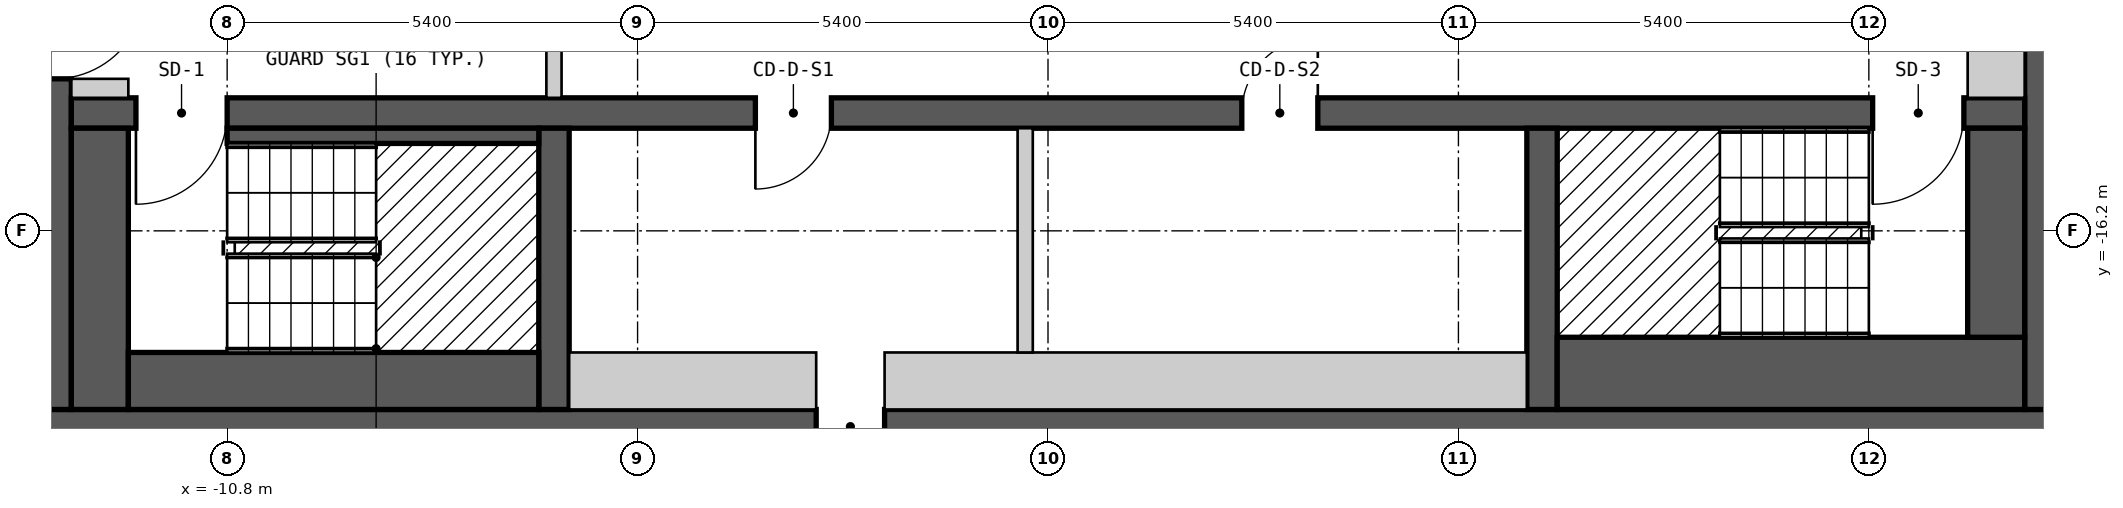
"""IFC4 building model, lengths in metres.
Left out: names, types, materials, properties, quantities, classifications, styles, units other than length and angle.
Written with IfcOpenShell. Run it as: python <this file> out.ifc"""

import sys

from ifc_helpers import new_model, si_unit, direction, frame, frame_2d, origin, place, context, subcontext, project, spatial, polyline, rectangle, outline, extrude, element, fill, save


model = new_model("IFC4")
c1 = context("Model", 3, precision=1e-05, world=origin(), true_north=direction((0.0, 1.0)))
c2 = subcontext(c1, "Body", "Model", "MODEL_VIEW")
j1 = project(units=[si_unit("LENGTHUNIT", "METRE"), si_unit("PLANEANGLEUNIT", "RADIAN")], contexts=[c1])
p1 = place(None, origin())
s1 = spatial("IfcSite", under=j1, at=p1, CompositionType="ELEMENT")
p2 = place(p1, origin())
s2 = spatial("IfcBuilding", under=s1, at=p2, CompositionType="ELEMENT")
p3 = place(p2, frame((0.0, 0.0, 238.8)))
s3 = spatial("IfcBuildingStorey", under=s2, at=p3, CompositionType="ELEMENT", Elevation=238.8)
p4 = place(p3, frame((-13.3, -18.775, 0.0), z_axis=(0.0, 0.0, 1.0), x_axis=(1.0, 0.0, 0.0)))
e1 = element("IfcWall", 1, at=p4, inside=s3, PredefinedType="SHEAR", context=c2, shape_type="SweptSolid", body=[
    extrude(rectangle(XDim=26.6, YDim=0.45, at=frame_2d((13.3, 0.0))), origin(), (0.0, 0.0, 1.0), 2.7),
])
p5 = place(p4, frame((10.25, 0.0, 0.0)))
e2 = element("IfcOpeningElement", 2, at=p5, cuts=e1, PredefinedType="OPENING", context=c2, shape_type="SweptSolid", body=[
    extrude(rectangle(XDim=0.9, YDim=2.1, at=frame_2d((0.45, 1.05))), frame((0.0, 0.235, 0.0), z_axis=(0.0, -1.0, 0.0), x_axis=(1.0, 0.0, 0.0)), (0.0, 0.0, 1.0), 0.47),
])
p6 = place(p3, frame((-13.075, -18.55, 0.0), z_axis=(0.0, 0.0, 1.0), x_axis=(0.0, 1.0, 0.0)))
e3 = element("IfcWall", 3, at=p6, inside=s3, PredefinedType="SHEAR", context=c2, shape_type="SweptSolid", body=[
    extrude(rectangle(XDim=13.1, YDim=0.45, at=frame_2d((6.55, 0.0))), origin(), (0.0, 0.0, 1.0), 2.7),
])
p7 = place(p6, frame((4.35, 0.0, 0.0)))
e4 = element("IfcOpeningElement", 4, at=p7, cuts=e3, PredefinedType="OPENING", context=c2, shape_type="SweptSolid", body=[
    extrude(rectangle(XDim=1.2, YDim=2.1, at=frame_2d((0.6, 1.05))), frame((0.0, 0.235, 0.0), z_axis=(0.0, -1.0, 0.0), x_axis=(1.0, 0.0, 0.0)), (0.0, 0.0, 1.0), 0.47),
])
p8 = place(p3, frame((13.075, -18.55, 0.0), z_axis=(0.0, 0.0, 1.0), x_axis=(0.0, 1.0, 0.0)))
e5 = element("IfcWall", 5, at=p8, inside=s3, PredefinedType="SHEAR", context=c2, shape_type="SweptSolid", body=[
    extrude(rectangle(XDim=13.1, YDim=0.45, at=frame_2d((6.55, 0.0))), origin(), (0.0, 0.0, 1.0), 2.7),
])
p9 = place(p3, frame((-12.85, -14.65, 0.0), z_axis=(0.0, 0.0, 1.0), x_axis=(1.0, 0.0, 0.0)))
e6 = element("IfcWall", 6, at=p9, inside=s3, PredefinedType="SHEAR", context=c2, shape_type="SweptSolid", body=[
    extrude(rectangle(XDim=25.7, YDim=0.4, at=frame_2d((12.85, 0.0))), origin(), (0.0, 0.0, 1.0), 2.7),
])
p10 = place(p9, frame((2.05, 0.0, 0.0), z_axis=(0.0, 0.0, 1.0), x_axis=(-1.0, 0.0, 0.0)))
e7 = element("IfcOpeningElement", 7, at=p10, cuts=e6, PredefinedType="OPENING", context=c2, shape_type="SweptSolid", body=[
    extrude(rectangle(XDim=1.2, YDim=2.1, at=frame_2d((0.6, 1.05))), frame((0.0, 0.21, 0.0), z_axis=(0.0, -1.0, 0.0), x_axis=(1.0, 0.0, 0.0)), (0.0, 0.0, 1.0), 0.42),
])
p11 = place(p9, frame((24.9, 0.0, 0.0), z_axis=(0.0, 0.0, 1.0), x_axis=(-1.0, 0.0, 0.0)))
e8 = element("IfcOpeningElement", 8, at=p11, cuts=e6, PredefinedType="OPENING", context=c2, shape_type="SweptSolid", body=[
    extrude(rectangle(XDim=1.2, YDim=2.1, at=frame_2d((0.6, 1.05))), frame((0.0, 0.21, 0.0), z_axis=(0.0, -1.0, 0.0), x_axis=(1.0, 0.0, 0.0)), (0.0, 0.0, 1.0), 0.42),
])
p12 = place(p9, frame((10.0, 0.0, 0.0), z_axis=(0.0, 0.0, 1.0), x_axis=(-1.0, 0.0, 0.0)))
e9 = element("IfcOpeningElement", 9, at=p12, cuts=e6, PredefinedType="OPENING", context=c2, shape_type="SweptSolid", body=[
    extrude(rectangle(XDim=1.0, YDim=2.1, at=frame_2d((0.5, 1.05))), frame((0.0, 0.21, 0.0), z_axis=(0.0, -1.0, 0.0), x_axis=(1.0, 0.0, 0.0)), (0.0, 0.0, 1.0), 0.42),
])
p13 = place(p9, frame((16.4, 0.0, 0.0), z_axis=(0.0, 0.0, 1.0), x_axis=(-1.0, 0.0, 0.0)))
e10 = element("IfcOpeningElement", 10, at=p13, cuts=e6, PredefinedType="OPENING", context=c2, shape_type="SweptSolid", body=[
    extrude(rectangle(XDim=1.0, YDim=2.1, at=frame_2d((0.5, 1.05))), frame((0.0, 0.21, 0.0), z_axis=(0.0, -1.0, 0.0), x_axis=(1.0, 0.0, 0.0)), (0.0, 0.0, 1.0), 0.42),
])
for number, where, z_axis, x_axis in (
    (11, (-6.5, -18.55, 0.0), (0.0, 0.0, 1.0), (0.0, 1.0, 0.0)),
    (12, (6.5, -18.55, 0.0), (0.0, 0.0, 1.0), (0.0, 1.0, 0.0)),
):
    element("IfcWall", number, at=place(p3, frame(where, z_axis=z_axis, x_axis=x_axis)), inside=s3, PredefinedType="SHEAR", context=c2, shape_type="SweptSolid", body=[
        extrude(rectangle(XDim=3.7, YDim=0.4, at=frame_2d((1.85, 0.0))), origin(), (0.0, 0.0, 1.0), 2.7),
    ])
p14 = place(p3, frame((-15.34, -18.37, 0.0), z_axis=(0.0, 0.0, 1.0), x_axis=(0.866022959057, -0.500004234368, 0.0)))
e13 = element("IfcWall", 13, at=p14, inside=s3, PredefinedType="SOLIDWALL", context=c2, shape_type="SweptSolid", body=[
    extrude(outline(polyline([(0.0, -0.15), (5.0, -0.15), (4.92, 0.15), (0.08, 0.15), (0.0, -0.15)])), origin(), (0.0, 0.0, 1.0), 2.7),
])
p15 = place(p14, frame((0.65, 0.0, 0.15)))
e14 = element("IfcOpeningElement", 14, at=p15, cuts=e13, PredefinedType="OPENING", context=c2, shape_type="SweptSolid", body=[
    extrude(rectangle(XDim=1.2, YDim=2.1, at=frame_2d((0.6, 1.05))), frame((0.0, 0.16, 0.0), z_axis=(0.0, -1.0, 0.0), x_axis=(1.0, 0.0, 0.0)), (0.0, 0.0, 1.0), 0.32),
])
p16 = place(p14, frame((3.15, 0.0, 0.15)))
e15 = element("IfcOpeningElement", 15, at=p16, cuts=e13, PredefinedType="OPENING", context=c2, shape_type="SweptSolid", body=[
    extrude(rectangle(XDim=1.2, YDim=2.1, at=frame_2d((0.6, 1.05))), frame((0.0, 0.16, 0.0), z_axis=(0.0, -1.0, 0.0), x_axis=(1.0, 0.0, 0.0)), (0.0, 0.0, 1.0), 0.32),
])
p17 = place(p3, frame((11.01, -20.87, 0.0), z_axis=(0.0, 0.0, 1.0), x_axis=(0.866022959057, 0.500004234368, 0.0)))
e16 = element("IfcWall", 16, at=p17, inside=s3, PredefinedType="SOLIDWALL", context=c2, shape_type="SweptSolid", body=[
    extrude(outline(polyline([(0.0, -0.15), (5.0, -0.15), (4.92, 0.15), (0.08, 0.15), (0.0, -0.15)])), origin(), (0.0, 0.0, 1.0), 2.7),
])
p18 = place(p17, frame((0.65, 0.0, 0.15)))
e17 = element("IfcOpeningElement", 17, at=p18, cuts=e16, PredefinedType="OPENING", context=c2, shape_type="SweptSolid", body=[
    extrude(rectangle(XDim=1.2, YDim=2.1, at=frame_2d((0.6, 1.05))), frame((0.0, 0.16, 0.0), z_axis=(0.0, -1.0, 0.0), x_axis=(1.0, 0.0, 0.0)), (0.0, 0.0, 1.0), 0.32),
])
p19 = place(p17, frame((3.149, 0.0, 0.15)))
e18 = element("IfcOpeningElement", 18, at=p19, cuts=e16, PredefinedType="OPENING", context=c2, shape_type="SweptSolid", body=[
    extrude(rectangle(XDim=1.2, YDim=2.1, at=frame_2d((0.6, 1.05))), frame((0.0, 0.16, 0.0), z_axis=(0.0, -1.0, 0.0), x_axis=(1.0, 0.0, 0.0)), (0.0, 0.0, 1.0), 0.32),
])
p20 = place(p3, frame((-12.475, -18.55, 0.0), z_axis=(0.0, 0.0, 1.0), x_axis=(0.0, 1.0, 0.0)))
e19 = element("IfcWall", 19, at=p20, inside=s3, PredefinedType="SOLIDWALL", context=c2, shape_type="SweptSolid", body=[
    extrude(rectangle(XDim=3.7, YDim=0.75, at=frame_2d((1.85, 0.0))), origin(), (0.0, 0.0, 1.0), 2.7),
])
p21 = place(p3, frame((-12.85, -14.325, 0.0), z_axis=(0.0, 0.0, 1.0), x_axis=(1.0, 0.0, 0.0)))
e20 = element("IfcWall", 20, at=p21, inside=s3, PredefinedType="PARTITIONING", context=c2, shape_type="SweptSolid", body=[
    extrude(rectangle(XDim=0.75, YDim=0.25, at=frame_2d((0.375, 0.0))), origin(), (0.0, 0.0, 1.0), 2.7),
])
p22 = place(p3, frame((-12.1, -18.175, 0.0), z_axis=(0.0, 0.0, 1.0), x_axis=(1.0, 0.0, 0.0)))
e21 = element("IfcWall", 21, at=p22, inside=s3, PredefinedType="SOLIDWALL", context=c2, shape_type="SweptSolid", body=[
    extrude(rectangle(XDim=5.4, YDim=0.75, at=frame_2d((2.7, 0.0))), origin(), (0.0, 0.0, 1.0), 2.7),
])
p23 = place(p3, frame((-10.8, -14.95, 0.0), z_axis=(0.0, 0.0, 1.0), x_axis=(1.0, 0.0, 0.0)))
e22 = element("IfcWall", 22, at=p23, inside=s3, PredefinedType="SOLIDWALL", context=c2, shape_type="SweptSolid", body=[
    extrude(rectangle(XDim=4.1, YDim=0.2, at=frame_2d((2.05, 0.0))), origin(), (0.0, 0.0, 1.0), 2.7),
])
p24 = place(p3, frame((-6.5, -14.45, 0.0), z_axis=(0.0, 0.0, 1.0), x_axis=(0.0, 1.0, 0.0)))
e23 = element("IfcWall", 23, at=p24, inside=s3, PredefinedType="PARTITIONING", context=c2, shape_type="SweptSolid", body=[
    extrude(rectangle(XDim=4.9, YDim=0.2, at=frame_2d((2.45, 0.0))), origin(), (0.0, 0.0, 1.0), 2.7),
])
p25 = place(p24, frame((3.15, 0.0, 0.0), z_axis=(0.0, 0.0, 1.0), x_axis=(-1.0, 0.0, 0.0)))
e24 = element("IfcOpeningElement", 24, at=p25, cuts=e23, PredefinedType="OPENING", context=c2, shape_type="SweptSolid", body=[
    extrude(rectangle(XDim=1.4, YDim=2.1, at=frame_2d((0.7, 1.05))), frame((0.0, 0.11, 0.0), z_axis=(0.0, -1.0, 0.0), x_axis=(1.0, 0.0, 0.0)), (0.0, 0.0, 1.0), 0.22),
])
p26 = place(p3, frame((-6.3, -18.175, 0.0), z_axis=(0.0, 0.0, 1.0), x_axis=(1.0, 0.0, 0.0)))
e25 = element("IfcWall", 25, at=p26, inside=s3, PredefinedType="PARTITIONING", context=c2, shape_type="SweptSolid", body=[
    extrude(rectangle(XDim=3.25, YDim=0.75, at=frame_2d((1.625, 0.0))), origin(), (0.0, 0.0, 1.0), 2.7),
])
p27 = place(p3, frame((-2.15, -18.175, 0.0), z_axis=(0.0, 0.0, 1.0), x_axis=(1.0, 0.0, 0.0)))
e26 = element("IfcWall", 26, at=p27, inside=s3, PredefinedType="PARTITIONING", context=c2, shape_type="SweptSolid", body=[
    extrude(rectangle(XDim=8.45, YDim=0.75, at=frame_2d((4.225, 0.0))), origin(), (0.0, 0.0, 1.0), 2.7),
])
p28 = place(p3, frame((-0.3, -17.8, 0.0), z_axis=(0.0, 0.0, 1.0), x_axis=(0.0, 1.0, 0.0)))
e27 = element("IfcWall", 27, at=p28, inside=s3, PredefinedType="PARTITIONING", context=c2, shape_type="SweptSolid", body=[
    extrude(rectangle(XDim=2.95, YDim=0.2, at=frame_2d((1.475, 0.0))), origin(), (0.0, 0.0, 1.0), 2.7),
])
p29 = place(p3, frame((6.7, -18.075, 0.0), z_axis=(0.0, 0.0, 1.0), x_axis=(1.0, 0.0, 0.0)))
e28 = element("IfcWall", 28, at=p29, inside=s3, PredefinedType="SOLIDWALL", context=c2, shape_type="SweptSolid", body=[
    extrude(rectangle(XDim=6.15, YDim=0.95, at=frame_2d((3.075, 0.0))), origin(), (0.0, 0.0, 1.0), 2.7),
])
p30 = place(p3, frame((12.475, -17.6, 0.0), z_axis=(0.0, 0.0, 1.0), x_axis=(0.0, 1.0, 0.0)))
e29 = element("IfcWall", 29, at=p30, inside=s3, PredefinedType="SOLIDWALL", context=c2, shape_type="SweptSolid", body=[
    extrude(rectangle(XDim=2.75, YDim=0.75, at=frame_2d((1.375, 0.0))), origin(), (0.0, 0.0, 1.0), 2.7),
])
p31 = place(p3, frame((12.475, -14.45, 0.0), z_axis=(0.0, 0.0, 1.0), x_axis=(0.0, 1.0, 0.0)))
e30 = element("IfcWall", 30, at=p31, inside=s3, PredefinedType="PARTITIONING", context=c2, shape_type="SweptSolid", body=[
    extrude(rectangle(XDim=8.25, YDim=0.75, at=frame_2d((4.125, 0.0))), origin(), (0.0, 0.0, 1.0), 2.7),
])
p32 = place(p10, origin())
e31 = element("IfcDoor", 31, at=p32, inside=s3, OperationType="SINGLE_SWING_RIGHT", PredefinedType="DOOR", context=c2, shape_type="SweptSolid", body=[
    extrude(rectangle(XDim=1.2, YDim=2.1, at=frame_2d((0.6, 1.05))), frame((0.0, 0.025, 0.0), z_axis=(0.0, -1.0, 0.0), x_axis=(1.0, 0.0, 0.0)), (0.0, 0.0, 1.0), 0.05),
])
fill(e7, e31)
p33 = place(p11, origin())
e32 = element("IfcDoor", 32, at=p33, inside=s3, OperationType="SINGLE_SWING_RIGHT", PredefinedType="DOOR", context=c2, shape_type="SweptSolid", body=[
    extrude(rectangle(XDim=1.2, YDim=2.1, at=frame_2d((0.6, 1.05))), frame((0.0, 0.025, 0.0), z_axis=(0.0, -1.0, 0.0), x_axis=(1.0, 0.0, 0.0)), (0.0, 0.0, 1.0), 0.05),
])
fill(e8, e32)
p34 = place(p7, origin())
e33 = element("IfcDoor", 33, at=p34, inside=s3, OperationType="SINGLE_SWING_RIGHT", PredefinedType="DOOR", context=c2, shape_type="SweptSolid", body=[
    extrude(rectangle(XDim=1.2, YDim=2.1, at=frame_2d((0.6, 1.05))), frame((0.0, 0.025, 0.0), z_axis=(0.0, -1.0, 0.0), x_axis=(1.0, 0.0, 0.0)), (0.0, 0.0, 1.0), 0.05),
])
fill(e4, e33)
p35 = place(p12, origin())
e34 = element("IfcDoor", 34, at=p35, inside=s3, OperationType="SINGLE_SWING_RIGHT", PredefinedType="DOOR", context=c2, shape_type="SweptSolid", body=[
    extrude(rectangle(XDim=1.0, YDim=2.1, at=frame_2d((0.5, 1.05))), frame((0.0, 0.025, 0.0), z_axis=(0.0, -1.0, 0.0), x_axis=(1.0, 0.0, 0.0)), (0.0, 0.0, 1.0), 0.05),
])
fill(e9, e34)
p36 = place(p13, origin())
e35 = element("IfcDoor", 35, at=p36, inside=s3, OperationType="SINGLE_SWING_LEFT", PredefinedType="DOOR", context=c2, shape_type="SweptSolid", body=[
    extrude(rectangle(XDim=1.0, YDim=2.1, at=frame_2d((0.5, 1.05))), frame((0.0, 0.025, 0.0), z_axis=(0.0, -1.0, 0.0), x_axis=(1.0, 0.0, 0.0)), (0.0, 0.0, 1.0), 0.05),
])
fill(e10, e35)
p37 = place(p5, origin())
e36 = element("IfcDoor", 36, at=p37, inside=s3, OperationType="SINGLE_SWING_RIGHT", PredefinedType="DOOR", context=c2, shape_type="SweptSolid", body=[
    extrude(rectangle(XDim=0.9, YDim=2.1, at=frame_2d((0.45, 1.05))), frame((0.0, 0.025, 0.0), z_axis=(0.0, -1.0, 0.0), x_axis=(1.0, 0.0, 0.0)), (0.0, 0.0, 1.0), 0.05),
])
fill(e2, e36)
save(model, sys.argv[1])
